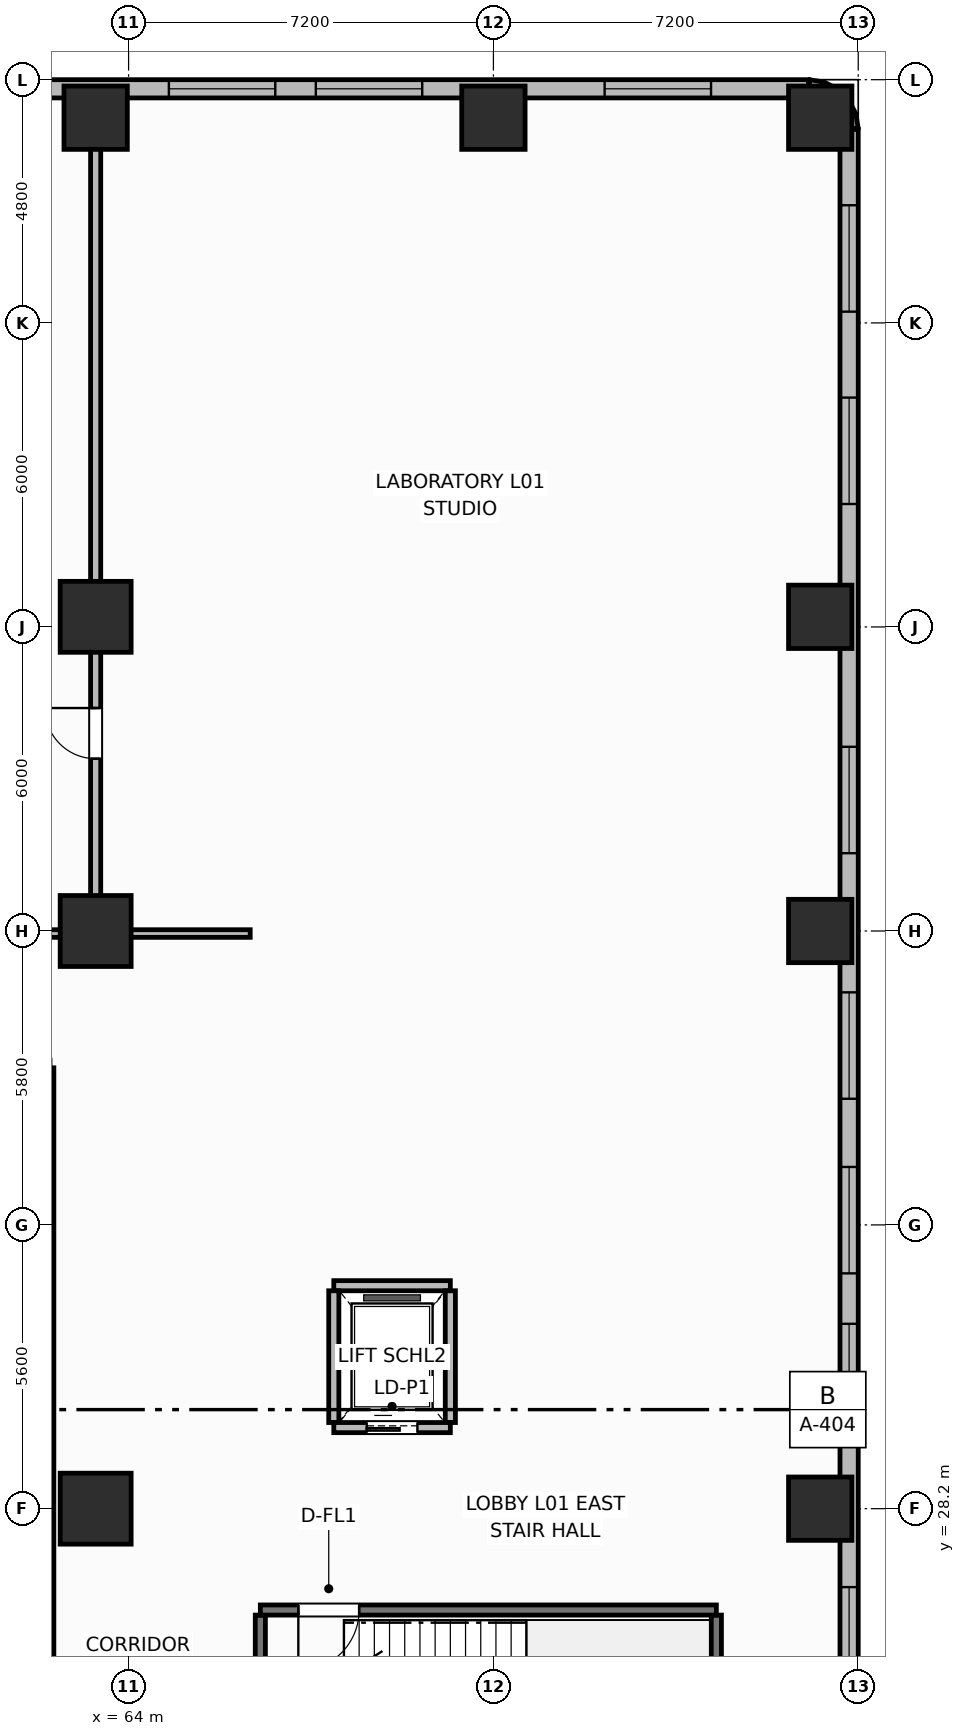
"""IFC4 building model, lengths in metres.
Left out: names, types, materials, properties, quantities, classifications, styles, units other than length and angle.
Written with IfcOpenShell. Run it as: python <this file> out.ifc"""

import sys

from ifc_helpers import new_model, si_unit, direction, frame, frame_2d, origin, origin_2d, place, context, subcontext, project, spatial, rectangle, extrude, element, fill, save


model = new_model("IFC4")
c1 = context("Model", 3, precision=1e-05, world=origin(), true_north=direction((0.0, 1.0)))
c2 = subcontext(c1, "Body", "Model", "MODEL_VIEW")
j1 = project(units=[si_unit("LENGTHUNIT", "METRE"), si_unit("PLANEANGLEUNIT", "RADIAN")], contexts=[c1])
p1 = place(None, origin())
s1 = spatial("IfcSite", under=j1, at=p1, CompositionType="ELEMENT")
p2 = place(p1, origin())
s2 = spatial("IfcBuilding", under=s1, at=p2, CompositionType="ELEMENT")
p3 = place(p2, frame((0.0, 0.0, 6.6)))
s3 = spatial("IfcBuildingStorey", under=s2, at=p3, CompositionType="ELEMENT", Elevation=6.6)
for number, where, z_axis, x_axis in (
    (1, (63.35, 55.65, 0.0), (0.0, 0.0, 1.0), (1.0, 0.0, 0.0)),
    (2, (71.2, 55.65, 0.0), (0.0, 0.0, 1.0), (1.0, 0.0, 0.0)),
    (3, (77.65, 28.2, 0.0), (0.0, 0.0, 1.0), (1.0, 0.0, 0.0)),
    (4, (77.65, 39.6, 0.0), (0.0, 0.0, 1.0), (1.0, 0.0, 0.0)),
    (5, (77.65, 45.8, 0.0), (0.0, 0.0, 1.0), (1.0, 0.0, 0.0)),
    (6, (77.65, 55.65, 0.0), (0.0, 0.0, 1.0), (1.0, 0.0, 0.0)),
):
    element("IfcColumn", number, at=place(p3, frame(where, z_axis=z_axis, x_axis=x_axis)), inside=s3, PredefinedType="COLUMN", context=c2, shape_type="SweptSolid", body=[
        extrude(rectangle(XDim=1.25, YDim=1.25, at=origin_2d()), origin(), (0.0, 0.0, 1.0), 4.5),
    ])
for number, where, z_axis, x_axis in (
    (7, (63.35, 28.2, 0.0), (0.0, 0.0, 1.0), (1.0, 0.0, 0.0)),
    (8, (63.35, 39.6, 0.0), (0.0, 0.0, 1.0), (1.0, 0.0, 0.0)),
    (9, (63.35, 45.8, 0.0), (0.0, 0.0, 1.0), (1.0, 0.0, 0.0)),
):
    element("IfcColumn", number, at=place(p3, frame(where, z_axis=z_axis, x_axis=x_axis)), inside=s3, PredefinedType="COLUMN", context=c2, shape_type="SweptSolid", body=[
        extrude(rectangle(XDim=1.4, YDim=1.4, at=origin_2d()), origin(), (0.0, 0.0, 1.0), 4.5),
    ])
p4 = place(p3, frame((78.22, 0.98, 0.0), z_axis=(0.0, 0.0, 1.0), x_axis=(0.0, 1.0, 0.0)))
e10 = element("IfcWall", 10, at=p4, inside=s3, PredefinedType="SOLIDWALL", context=c2, shape_type="SweptSolid", body=[
    extrude(rectangle(XDim=54.44, YDim=0.36, at=frame_2d((27.22, 0.0))), origin(), (0.0, 0.0, 1.0), 3.48),
])
p5 = place(p4, frame((1.498, 0.0, 0.85)))
e11 = element("IfcOpeningElement", 11, at=p5, cuts=e10, PredefinedType="OPENING", context=c2, shape_type="SweptSolid", body=[
    extrude(rectangle(XDim=2.1, YDim=2.2, at=frame_2d((1.05, 1.1))), frame((0.0, 0.19, 0.0), z_axis=(0.0, -1.0, 0.0), x_axis=(1.0, 0.0, 0.0)), (0.0, 0.0, 1.0), 0.38),
])
p6 = place(p4, frame((5.294, 0.0, 0.85)))
e12 = element("IfcOpeningElement", 12, at=p6, cuts=e10, PredefinedType="OPENING", context=c2, shape_type="SweptSolid", body=[
    extrude(rectangle(XDim=2.1, YDim=2.2, at=frame_2d((1.05, 1.1))), frame((0.0, 0.19, 0.0), z_axis=(0.0, -1.0, 0.0), x_axis=(1.0, 0.0, 0.0)), (0.0, 0.0, 1.0), 0.38),
])
p7 = place(p4, frame((12.185, 0.0, 0.85)))
e13 = element("IfcOpeningElement", 13, at=p7, cuts=e10, PredefinedType="OPENING", context=c2, shape_type="SweptSolid", body=[
    extrude(rectangle(XDim=2.1, YDim=2.2, at=frame_2d((1.05, 1.1))), frame((0.0, 0.19, 0.0), z_axis=(0.0, -1.0, 0.0), x_axis=(1.0, 0.0, 0.0)), (0.0, 0.0, 1.0), 0.38),
])
p8 = place(p4, frame((17.031, 0.0, 0.85)))
e14 = element("IfcOpeningElement", 14, at=p8, cuts=e10, PredefinedType="OPENING", context=c2, shape_type="SweptSolid", body=[
    extrude(rectangle(XDim=2.1, YDim=2.2, at=frame_2d((1.05, 1.1))), frame((0.0, 0.19, 0.0), z_axis=(0.0, -1.0, 0.0), x_axis=(1.0, 0.0, 0.0)), (0.0, 0.0, 1.0), 0.38),
])
p9 = place(p4, frame((20.476, 0.0, 0.85)))
e15 = element("IfcOpeningElement", 15, at=p9, cuts=e10, PredefinedType="OPENING", context=c2, shape_type="SweptSolid", body=[
    extrude(rectangle(XDim=2.1, YDim=2.2, at=frame_2d((1.05, 1.1))), frame((0.0, 0.19, 0.0), z_axis=(0.0, -1.0, 0.0), x_axis=(1.0, 0.0, 0.0)), (0.0, 0.0, 1.0), 0.38),
])
p10 = place(p4, frame((23.572, 0.0, 0.85)))
e16 = element("IfcOpeningElement", 16, at=p10, cuts=e10, PredefinedType="OPENING", context=c2, shape_type="SweptSolid", body=[
    extrude(rectangle(XDim=2.1, YDim=2.2, at=frame_2d((1.05, 1.1))), frame((0.0, 0.19, 0.0), z_axis=(0.0, -1.0, 0.0), x_axis=(1.0, 0.0, 0.0)), (0.0, 0.0, 1.0), 0.38),
])
p11 = place(p4, frame((28.768, 0.0, 0.85)))
e17 = element("IfcOpeningElement", 17, at=p11, cuts=e10, PredefinedType="OPENING", context=c2, shape_type="SweptSolid", body=[
    extrude(rectangle(XDim=2.1, YDim=2.2, at=frame_2d((1.05, 1.1))), frame((0.0, 0.19, 0.0), z_axis=(0.0, -1.0, 0.0), x_axis=(1.0, 0.0, 0.0)), (0.0, 0.0, 1.0), 0.38),
])
p12 = place(p4, frame((31.864, 0.0, 0.85)))
e18 = element("IfcOpeningElement", 18, at=p12, cuts=e10, PredefinedType="OPENING", context=c2, shape_type="SweptSolid", body=[
    extrude(rectangle(XDim=2.1, YDim=2.2, at=frame_2d((1.05, 1.1))), frame((0.0, 0.19, 0.0), z_axis=(0.0, -1.0, 0.0), x_axis=(1.0, 0.0, 0.0)), (0.0, 0.0, 1.0), 0.38),
])
p13 = place(p4, frame((35.309, 0.0, 0.85)))
e19 = element("IfcOpeningElement", 19, at=p13, cuts=e10, PredefinedType="OPENING", context=c2, shape_type="SweptSolid", body=[
    extrude(rectangle(XDim=2.1, YDim=2.2, at=frame_2d((1.05, 1.1))), frame((0.0, 0.19, 0.0), z_axis=(0.0, -1.0, 0.0), x_axis=(1.0, 0.0, 0.0)), (0.0, 0.0, 1.0), 0.38),
])
p14 = place(p4, frame((40.155, 0.0, 0.85)))
e20 = element("IfcOpeningElement", 20, at=p14, cuts=e10, PredefinedType="OPENING", context=c2, shape_type="SweptSolid", body=[
    extrude(rectangle(XDim=2.1, YDim=2.2, at=frame_2d((1.05, 1.1))), frame((0.0, 0.19, 0.0), z_axis=(0.0, -1.0, 0.0), x_axis=(1.0, 0.0, 0.0)), (0.0, 0.0, 1.0), 0.38),
])
p15 = place(p4, frame((47.046, 0.0, 0.85)))
e21 = element("IfcOpeningElement", 21, at=p15, cuts=e10, PredefinedType="OPENING", context=c2, shape_type="SweptSolid", body=[
    extrude(rectangle(XDim=2.1, YDim=2.2, at=frame_2d((1.05, 1.1))), frame((0.0, 0.19, 0.0), z_axis=(0.0, -1.0, 0.0), x_axis=(1.0, 0.0, 0.0)), (0.0, 0.0, 1.0), 0.38),
])
p16 = place(p4, frame((50.842, 0.0, 0.85)))
e22 = element("IfcOpeningElement", 22, at=p16, cuts=e10, PredefinedType="OPENING", context=c2, shape_type="SweptSolid", body=[
    extrude(rectangle(XDim=2.1, YDim=2.2, at=frame_2d((1.05, 1.1))), frame((0.0, 0.19, 0.0), z_axis=(0.0, -1.0, 0.0), x_axis=(1.0, 0.0, 0.0)), (0.0, 0.0, 1.0), 0.38),
])
p17 = place(p3, frame((78.22, 55.42, 0.0), z_axis=(0.0, 0.0, 1.0), x_axis=(-0.156012644899, 0.987755058014, 0.0)))
e23 = element("IfcWall", 23, at=p17, inside=s3, PredefinedType="SOLIDWALL", context=c2, shape_type="SweptSolid", body=[
    extrude(rectangle(XDim=0.25, YDim=0.36, at=frame_2d((0.125, 0.0))), origin(), (0.0, 0.0, 1.0), 3.48),
])
for number, where, z_axis, x_axis in (
    (24, (78.181, 55.667, 0.0), (0.0, 0.0, 1.0), (-0.455, 0.891, 0.0)),
    (25, (78.067, 55.89, 0.0), (0.0, 0.0, 1.0), (-0.707, 0.707, 0.0)),
    (26, (77.89, 56.067, 0.0), (0.0, 0.0, 1.0), (-0.891, 0.455, 0.0)),
):
    element("IfcWall", number, at=place(p3, frame(where, z_axis=z_axis, x_axis=x_axis)), inside=s3, PredefinedType="SOLIDWALL", context=c2, shape_type="SweptSolid", body=[
        extrude(rectangle(XDim=0.25, YDim=0.36, at=frame_2d((0.125, 0.0))), origin(), (0.0, 0.0, 1.0), 3.48),
    ])
p18 = place(p3, frame((77.667, 56.181, 0.0), z_axis=(0.0, 0.0, 1.0), x_axis=(-0.987755058014, 0.156012644899, 0.0)))
e27 = element("IfcWall", 27, at=p18, inside=s3, PredefinedType="SOLIDWALL", context=c2, shape_type="SweptSolid", body=[
    extrude(rectangle(XDim=0.25, YDim=0.36, at=frame_2d((0.125, 0.0))), origin(), (0.0, 0.0, 1.0), 3.48),
])
p19 = place(p3, frame((77.42, 56.22, 0.0), z_axis=(0.0, 0.0, 1.0), x_axis=(-1.0, 0.0, 0.0)))
e28 = element("IfcWall", 28, at=p19, inside=s3, PredefinedType="SOLIDWALL", context=c2, shape_type="SweptSolid", body=[
    extrude(rectangle(XDim=15.25, YDim=0.36, at=frame_2d((7.625, 0.0))), origin(), (0.0, 0.0, 1.0), 3.48),
])
p20 = place(p19, frame((1.925, 0.0, 0.85)))
e29 = element("IfcOpeningElement", 29, at=p20, cuts=e28, PredefinedType="OPENING", context=c2, shape_type="SweptSolid", body=[
    extrude(rectangle(XDim=2.1, YDim=2.2, at=frame_2d((1.05, 1.1))), frame((0.0, 0.19, 0.0), z_axis=(0.0, -1.0, 0.0), x_axis=(1.0, 0.0, 0.0)), (0.0, 0.0, 1.0), 0.38),
])
p21 = place(p19, frame((7.625, 0.0, 0.85)))
e30 = element("IfcOpeningElement", 30, at=p21, cuts=e28, PredefinedType="OPENING", context=c2, shape_type="SweptSolid", body=[
    extrude(rectangle(XDim=2.1, YDim=2.2, at=frame_2d((1.05, 1.1))), frame((0.0, 0.19, 0.0), z_axis=(0.0, -1.0, 0.0), x_axis=(1.0, 0.0, 0.0)), (0.0, 0.0, 1.0), 0.38),
])
p22 = place(p19, frame((10.525, 0.0, 0.85)))
e31 = element("IfcOpeningElement", 31, at=p22, cuts=e28, PredefinedType="OPENING", context=c2, shape_type="SweptSolid", body=[
    extrude(rectangle(XDim=2.1, YDim=2.2, at=frame_2d((1.05, 1.1))), frame((0.0, 0.19, 0.0), z_axis=(0.0, -1.0, 0.0), x_axis=(1.0, 0.0, 0.0)), (0.0, 0.0, 1.0), 0.38),
])
for number, where, z_axis, x_axis in (
    (32, (66.6, 22.7, 0.0), (0.0, 0.0, 1.0), (0.0, 1.0, 0.0)),
    (33, (75.6, 22.7, 0.0), (0.0, 0.0, 1.0), (0.0, 1.0, 0.0)),
):
    element("IfcWall", number, at=place(p3, frame(where, z_axis=z_axis, x_axis=x_axis)), inside=s3, PredefinedType="SHEAR", context=c2, shape_type="SweptSolid", body=[
        extrude(rectangle(XDim=3.4, YDim=0.2, at=frame_2d((1.7, 0.0))), origin(), (0.0, 0.0, 1.0), 4.5),
    ])
p23 = place(p3, frame((75.6, 26.2, 0.0), z_axis=(0.0, 0.0, 1.0), x_axis=(-1.0, 0.0, 0.0)))
e34 = element("IfcWall", 34, at=p23, inside=s3, PredefinedType="SHEAR", context=c2, shape_type="SweptSolid", body=[
    extrude(rectangle(XDim=9.0, YDim=0.2, at=frame_2d((4.5, 0.0))), origin(), (0.0, 0.0, 1.0), 4.5),
])
p24 = place(p23, frame((7.05, 0.0, 0.0)))
e35 = element("IfcOpeningElement", 35, at=p24, cuts=e34, PredefinedType="OPENING", context=c2, shape_type="SweptSolid", body=[
    extrude(rectangle(XDim=1.2, YDim=2.15, at=frame_2d((0.6, 1.075))), frame((0.0, 0.11, 0.0), z_axis=(0.0, -1.0, 0.0), x_axis=(1.0, 0.0, 0.0)), (0.0, 0.0, 1.0), 0.22),
])
p25 = place(p3, frame((68.05, 32.6, 0.0), z_axis=(0.0, 0.0, 1.0), x_axis=(1.0, 0.0, 0.0)))
e36 = element("IfcWall", 36, at=p25, inside=s3, PredefinedType="PARTITIONING", context=c2, shape_type="SweptSolid", body=[
    extrude(rectangle(XDim=2.3, YDim=0.2, at=frame_2d((1.15, 0.0))), origin(), (0.0, 0.0, 1.0), 3.42),
])
for number, where, z_axis, x_axis in (
    (37, (68.05, 29.9, 0.0), (0.0, 0.0, 1.0), (0.0, 1.0, 0.0)),
    (38, (70.35, 29.9, 0.0), (0.0, 0.0, 1.0), (0.0, 1.0, 0.0)),
):
    element("IfcWall", number, at=place(p3, frame(where, z_axis=z_axis, x_axis=x_axis)), inside=s3, PredefinedType="PARTITIONING", context=c2, shape_type="SweptSolid", body=[
        extrude(rectangle(XDim=2.6, YDim=0.2, at=frame_2d((1.3, 0.0))), origin(), (0.0, 0.0, 1.0), 3.42),
    ])
p26 = place(p3, frame((68.05, 29.8, 0.0), z_axis=(0.0, 0.0, 1.0), x_axis=(1.0, 0.0, 0.0)))
e39 = element("IfcWall", 39, at=p26, inside=s3, PredefinedType="PARTITIONING", context=c2, shape_type="SweptSolid", body=[
    extrude(rectangle(XDim=2.3, YDim=0.2, at=frame_2d((1.15, 0.0))), origin(), (0.0, 0.0, 1.0), 3.42),
])
p27 = place(p26, frame((0.65, 0.0, 0.0)))
e40 = element("IfcOpeningElement", 40, at=p27, cuts=e39, PredefinedType="OPENING", context=c2, shape_type="SweptSolid", body=[
    extrude(rectangle(XDim=1.0, YDim=2.15, at=frame_2d((0.5, 1.075))), frame((0.0, 0.11, 0.0), z_axis=(0.0, -1.0, 0.0), x_axis=(1.0, 0.0, 0.0)), (0.0, 0.0, 1.0), 0.22),
])
p28 = place(p3, frame((62.45, 19.5, 0.0), z_axis=(0.0, 0.0, 1.0), x_axis=(0.0, 1.0, 0.0)))
e41 = element("IfcWall", 41, at=p28, inside=s3, PredefinedType="PARTITIONING", context=c2, shape_type="SweptSolid", body=[
    extrude(rectangle(XDim=17.4, YDim=0.15, at=frame_2d((8.7, 0.0))), origin(), (0.0, 0.0, 1.0), 3.42),
])
p29 = place(p3, frame((63.35, 39.6, 0.0), z_axis=(0.0, 0.0, 1.0), x_axis=(0.0, 1.0, 0.0)))
e42 = element("IfcWall", 42, at=p29, inside=s3, PredefinedType="PARTITIONING", context=c2, shape_type="SweptSolid", body=[
    extrude(rectangle(XDim=16.4, YDim=0.2, at=frame_2d((8.2, 0.0))), origin(), (0.0, 0.0, 1.0), 3.42),
])
p30 = place(p29, frame((3.4, 0.0, 0.0)))
e43 = element("IfcOpeningElement", 43, at=p30, cuts=e42, PredefinedType="OPENING", context=c2, shape_type="SweptSolid", body=[
    extrude(rectangle(XDim=1.0, YDim=2.15, at=frame_2d((0.5, 1.075))), frame((0.0, 0.11, 0.0), z_axis=(0.0, -1.0, 0.0), x_axis=(1.0, 0.0, 0.0)), (0.0, 0.0, 1.0), 0.22),
])
p31 = place(p3, frame((66.4, 39.55, 0.0), z_axis=(0.0, 0.0, 1.0), x_axis=(-1.0, 0.0, 0.0)))
e44 = element("IfcWall", 44, at=p31, inside=s3, PredefinedType="PARTITIONING", context=c2, shape_type="SweptSolid", body=[
    extrude(rectangle(XDim=13.25, YDim=0.15, at=frame_2d((6.625, 0.0))), origin(), (0.0, 0.0, 1.0), 3.42),
])
p32 = place(p31, frame((5.5, 0.0, 0.0)))
e45 = element("IfcOpeningElement", 45, at=p32, cuts=e44, PredefinedType="OPENING", context=c2, shape_type="SweptSolid", body=[
    extrude(rectangle(XDim=1.0, YDim=2.15, at=frame_2d((0.5, 1.075))), frame((0.0, 0.085, 0.0), z_axis=(0.0, -1.0, 0.0), x_axis=(1.0, 0.0, 0.0)), (0.0, 0.0, 1.0), 0.17),
])
p33 = place(p10, origin())
e46 = element("IfcWindow", 46, at=p33, inside=s3, PartitioningType="SINGLE_PANEL", PredefinedType="WINDOW", context=c2, shape_type="SweptSolid", body=[
    extrude(rectangle(XDim=2.1, YDim=2.2, at=frame_2d((1.05, 1.1))), frame((0.0, 0.03, 0.0), z_axis=(0.0, -1.0, 0.0), x_axis=(1.0, 0.0, 0.0)), (0.0, 0.0, 1.0), 0.06),
])
fill(e16, e46)
p34 = place(p11, origin())
e47 = element("IfcWindow", 47, at=p34, inside=s3, PartitioningType="SINGLE_PANEL", PredefinedType="WINDOW", context=c2, shape_type="SweptSolid", body=[
    extrude(rectangle(XDim=2.1, YDim=2.2, at=frame_2d((1.05, 1.1))), frame((0.0, 0.03, 0.0), z_axis=(0.0, -1.0, 0.0), x_axis=(1.0, 0.0, 0.0)), (0.0, 0.0, 1.0), 0.06),
])
fill(e17, e47)
p35 = place(p12, origin())
e48 = element("IfcWindow", 48, at=p35, inside=s3, PartitioningType="SINGLE_PANEL", PredefinedType="WINDOW", context=c2, shape_type="SweptSolid", body=[
    extrude(rectangle(XDim=2.1, YDim=2.2, at=frame_2d((1.05, 1.1))), frame((0.0, 0.03, 0.0), z_axis=(0.0, -1.0, 0.0), x_axis=(1.0, 0.0, 0.0)), (0.0, 0.0, 1.0), 0.06),
])
fill(e18, e48)
p36 = place(p13, origin())
e49 = element("IfcWindow", 49, at=p36, inside=s3, PartitioningType="SINGLE_PANEL", PredefinedType="WINDOW", context=c2, shape_type="SweptSolid", body=[
    extrude(rectangle(XDim=2.1, YDim=2.2, at=frame_2d((1.05, 1.1))), frame((0.0, 0.03, 0.0), z_axis=(0.0, -1.0, 0.0), x_axis=(1.0, 0.0, 0.0)), (0.0, 0.0, 1.0), 0.06),
])
fill(e19, e49)
p37 = place(p14, origin())
e50 = element("IfcWindow", 50, at=p37, inside=s3, PartitioningType="SINGLE_PANEL", PredefinedType="WINDOW", context=c2, shape_type="SweptSolid", body=[
    extrude(rectangle(XDim=2.1, YDim=2.2, at=frame_2d((1.05, 1.1))), frame((0.0, 0.03, 0.0), z_axis=(0.0, -1.0, 0.0), x_axis=(1.0, 0.0, 0.0)), (0.0, 0.0, 1.0), 0.06),
])
fill(e20, e50)
p38 = place(p15, origin())
e51 = element("IfcWindow", 51, at=p38, inside=s3, PartitioningType="SINGLE_PANEL", PredefinedType="WINDOW", context=c2, shape_type="SweptSolid", body=[
    extrude(rectangle(XDim=2.1, YDim=2.2, at=frame_2d((1.05, 1.1))), frame((0.0, 0.03, 0.0), z_axis=(0.0, -1.0, 0.0), x_axis=(1.0, 0.0, 0.0)), (0.0, 0.0, 1.0), 0.06),
])
fill(e21, e51)
p39 = place(p16, origin())
e52 = element("IfcWindow", 52, at=p39, inside=s3, PartitioningType="SINGLE_PANEL", PredefinedType="WINDOW", context=c2, shape_type="SweptSolid", body=[
    extrude(rectangle(XDim=2.1, YDim=2.2, at=frame_2d((1.05, 1.1))), frame((0.0, 0.03, 0.0), z_axis=(0.0, -1.0, 0.0), x_axis=(1.0, 0.0, 0.0)), (0.0, 0.0, 1.0), 0.06),
])
fill(e22, e52)
p40 = place(p20, origin())
e53 = element("IfcWindow", 53, at=p40, inside=s3, PartitioningType="SINGLE_PANEL", PredefinedType="WINDOW", context=c2, shape_type="SweptSolid", body=[
    extrude(rectangle(XDim=2.1, YDim=2.2, at=frame_2d((1.05, 1.1))), frame((0.0, 0.03, 0.0), z_axis=(0.0, -1.0, 0.0), x_axis=(1.0, 0.0, 0.0)), (0.0, 0.0, 1.0), 0.06),
])
fill(e29, e53)
p41 = place(p21, origin())
e54 = element("IfcWindow", 54, at=p41, inside=s3, PartitioningType="SINGLE_PANEL", PredefinedType="WINDOW", context=c2, shape_type="SweptSolid", body=[
    extrude(rectangle(XDim=2.1, YDim=2.2, at=frame_2d((1.05, 1.1))), frame((0.0, 0.03, 0.0), z_axis=(0.0, -1.0, 0.0), x_axis=(1.0, 0.0, 0.0)), (0.0, 0.0, 1.0), 0.06),
])
fill(e30, e54)
p42 = place(p22, origin())
e55 = element("IfcWindow", 55, at=p42, inside=s3, PartitioningType="SINGLE_PANEL", PredefinedType="WINDOW", context=c2, shape_type="SweptSolid", body=[
    extrude(rectangle(XDim=2.1, YDim=2.2, at=frame_2d((1.05, 1.1))), frame((0.0, 0.03, 0.0), z_axis=(0.0, -1.0, 0.0), x_axis=(1.0, 0.0, 0.0)), (0.0, 0.0, 1.0), 0.06),
])
fill(e31, e55)
p43 = place(p24, origin())
e56 = element("IfcDoor", 56, at=p43, inside=s3, OperationType="SINGLE_SWING_RIGHT", PredefinedType="DOOR", context=c2, shape_type="SweptSolid", body=[
    extrude(rectangle(XDim=1.2, YDim=2.15, at=frame_2d((0.6, 1.075))), frame((0.0, 0.025, 0.0), z_axis=(0.0, -1.0, 0.0), x_axis=(1.0, 0.0, 0.0)), (0.0, 0.0, 1.0), 0.05),
])
fill(e35, e56)
p44 = place(p27, origin())
e57 = element("IfcDoor", 57, at=p44, inside=s3, OperationType="SLIDING_TO_LEFT", PredefinedType="DOOR", context=c2, shape_type="SweptSolid", body=[
    extrude(rectangle(XDim=1.0, YDim=2.15, at=frame_2d((0.5, 1.075))), frame((0.0, 0.025, 0.0), z_axis=(0.0, -1.0, 0.0), x_axis=(1.0, 0.0, 0.0)), (0.0, 0.0, 1.0), 0.05),
])
fill(e40, e57)
p45 = place(p30, origin())
e58 = element("IfcDoor", 58, at=p45, inside=s3, OperationType="SINGLE_SWING_RIGHT", PredefinedType="DOOR", context=c2, shape_type="SweptSolid", body=[
    extrude(rectangle(XDim=1.0, YDim=2.15, at=frame_2d((0.5, 1.075))), frame((0.0, 0.025, 0.0), z_axis=(0.0, -1.0, 0.0), x_axis=(1.0, 0.0, 0.0)), (0.0, 0.0, 1.0), 0.05),
])
fill(e43, e58)
save(model, sys.argv[1])
